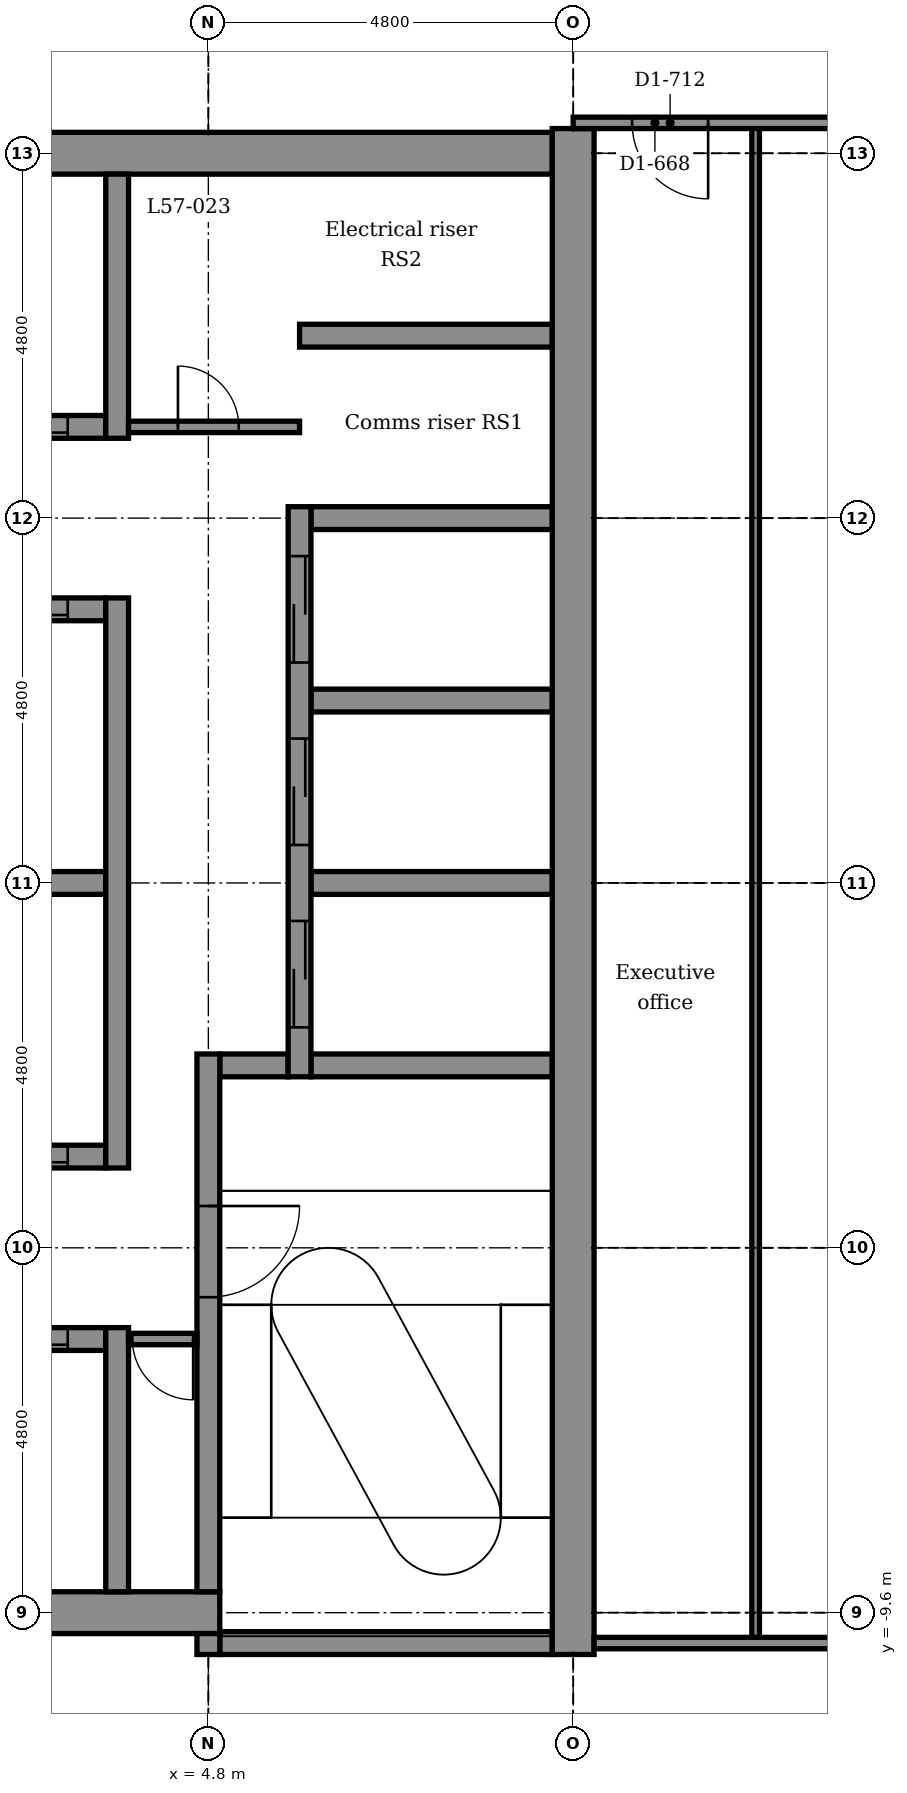
"""IFC4 building model, lengths in metres.
Left out: names, types, materials, properties, quantities, classifications, styles, units other than length and angle.
Written with IfcOpenShell. Run it as: python <this file> out.ifc"""

import sys

from ifc_helpers import new_model, si_unit, direction, frame, frame_2d, origin, place, context, subcontext, project, spatial, rectangle, extrude, element, fill, save


model = new_model("IFC4")
c1 = context("Model", 3, precision=1e-05, world=origin(), true_north=direction((0.0, 1.0)))
c2 = subcontext(c1, "Body", "Model", "MODEL_VIEW")
j1 = project(units=[si_unit("LENGTHUNIT", "METRE"), si_unit("PLANEANGLEUNIT", "RADIAN")], contexts=[c1])
p1 = place(None, origin())
s1 = spatial("IfcSite", under=j1, at=p1, CompositionType="ELEMENT")
p2 = place(p1, origin())
s2 = spatial("IfcBuilding", under=s1, at=p2, CompositionType="ELEMENT")
p3 = place(p2, frame((0.0, 0.0, 257.9)))
s3 = spatial("IfcBuildingStorey", under=s2, at=p3, CompositionType="ELEMENT", Elevation=257.9)
p4 = place(p3, frame((4.95, -10.0, -0.15), z_axis=(0.0, 0.0, 1.0), x_axis=(1.0, 0.0, 0.0)))
e1 = element("IfcWall", 1, at=p4, inside=s3, PredefinedType="STANDARD", context=c2, shape_type="SweptSolid", body=[
    extrude(rectangle(XDim=4.375, YDim=0.3, at=frame_2d((2.188, 0.0))), origin(), (0.0, 0.0, 1.0), 3.9),
])
p5 = place(p3, frame((-5.25, -9.6, -0.15), z_axis=(0.0, 0.0, 1.0), x_axis=(1.0, 0.0, 0.0)))
e2 = element("IfcWall", 2, at=p5, inside=s3, PredefinedType="SHEAR", context=c2, shape_type="SweptSolid", body=[
    extrude(rectangle(XDim=10.2, YDim=0.55, at=frame_2d((5.1, 0.0))), origin(), (0.0, 0.0, 1.0), 3.9),
])
p6 = place(p5, frame((0.6, 0.0, 0.15)))
e3 = element("IfcOpeningElement", 3, at=p6, cuts=e2, PredefinedType="OPENING", context=c2, shape_type="SweptSolid", body=[
    extrude(rectangle(XDim=0.9, YDim=2.1, at=frame_2d((0.45, 1.05))), frame((0.0, 0.285, 0.0), z_axis=(0.0, -1.0, 0.0), x_axis=(1.0, 0.0, 0.0)), (0.0, 0.0, 1.0), 0.57),
])
p7 = place(p3, frame((1.35, -6.0, -0.15), z_axis=(0.0, 0.0, 1.0), x_axis=(1.0, 0.0, 0.0)))
e4 = element("IfcWall", 4, at=p7, inside=s3, PredefinedType="STANDARD", context=c2, shape_type="SweptSolid", body=[
    extrude(rectangle(XDim=2.1, YDim=0.3, at=frame_2d((1.05, 0.0))), origin(), (0.0, 0.0, 1.0), 3.9),
])
p8 = place(p7, frame((0.5, 0.0, 0.15)))
e5 = element("IfcOpeningElement", 5, at=p8, cuts=e4, PredefinedType="OPENING", context=c2, shape_type="SweptSolid", body=[
    extrude(rectangle(XDim=1.1, YDim=2.1, at=frame_2d((0.55, 1.05))), frame((0.0, 0.16, 0.0), z_axis=(0.0, -1.0, 0.0), x_axis=(1.0, 0.0, 0.0)), (0.0, 0.0, 1.0), 0.32),
])
p9 = place(p3, frame((1.35, -3.6, -0.15), z_axis=(0.0, 0.0, 1.0), x_axis=(1.0, 0.0, 0.0)))
e6 = element("IfcWall", 6, at=p9, inside=s3, PredefinedType="STANDARD", context=c2, shape_type="SweptSolid", body=[
    extrude(rectangle(XDim=2.1, YDim=0.3, at=frame_2d((1.05, 0.0))), origin(), (0.0, 0.0, 1.0), 3.9),
])
p10 = place(p9, frame((0.5, 0.0, 0.15)))
e7 = element("IfcOpeningElement", 7, at=p10, cuts=e6, PredefinedType="OPENING", context=c2, shape_type="SweptSolid", body=[
    extrude(rectangle(XDim=1.1, YDim=2.1, at=frame_2d((0.55, 1.05))), frame((0.0, 0.16, 0.0), z_axis=(0.0, -1.0, 0.0), x_axis=(1.0, 0.0, 0.0)), (0.0, 0.0, 1.0), 0.32),
])
p11 = place(p3, frame((4.95, -2.4, -0.15), z_axis=(0.0, 0.0, 1.0), x_axis=(1.0, 0.0, 0.0)))
e8 = element("IfcWall", 8, at=p11, inside=s3, PredefinedType="STANDARD", context=c2, shape_type="SweptSolid", body=[
    extrude(rectangle(XDim=0.9, YDim=0.3, at=frame_2d((0.45, 0.0))), origin(), (0.0, 0.0, 1.0), 3.9),
])
p12 = place(p3, frame((6.15, -2.4, -0.15), z_axis=(0.0, 0.0, 1.0), x_axis=(1.0, 0.0, 0.0)))
e9 = element("IfcWall", 9, at=p12, inside=s3, PredefinedType="STANDARD", context=c2, shape_type="SweptSolid", body=[
    extrude(rectangle(XDim=3.175, YDim=0.3, at=frame_2d((1.587, 0.0))), origin(), (0.0, 0.0, 1.0), 3.9),
])
p13 = place(p3, frame((1.35, 0.0, -0.15), z_axis=(0.0, 0.0, 1.0), x_axis=(1.0, 0.0, 0.0)))
e10 = element("IfcWall", 10, at=p13, inside=s3, PredefinedType="STANDARD", context=c2, shape_type="SweptSolid", body=[
    extrude(rectangle(XDim=2.1, YDim=0.3, at=frame_2d((1.05, 0.0))), origin(), (0.0, 0.0, 1.0), 3.9),
])
for number, where, z_axis, x_axis in (
    (11, (6.15, 0.0, -0.15), (0.0, 0.0, 1.0), (1.0, 0.0, 0.0)),
    (12, (6.15, 2.4, -0.15), (0.0, 0.0, 1.0), (1.0, 0.0, 0.0)),
):
    element("IfcWall", number, at=place(p3, frame(where, z_axis=z_axis, x_axis=x_axis)), inside=s3, PredefinedType="STANDARD", context=c2, shape_type="SweptSolid", body=[
        extrude(rectangle(XDim=3.175, YDim=0.3, at=frame_2d((1.587, 0.0))), origin(), (0.0, 0.0, 1.0), 3.9),
    ])
p14 = place(p3, frame((1.35, 3.6, -0.15), z_axis=(0.0, 0.0, 1.0), x_axis=(1.0, 0.0, 0.0)))
e13 = element("IfcWall", 13, at=p14, inside=s3, PredefinedType="STANDARD", context=c2, shape_type="SweptSolid", body=[
    extrude(rectangle(XDim=2.1, YDim=0.3, at=frame_2d((1.05, 0.0))), origin(), (0.0, 0.0, 1.0), 3.9),
])
p15 = place(p14, frame((0.5, 0.0, 0.15)))
e14 = element("IfcOpeningElement", 14, at=p15, cuts=e13, PredefinedType="OPENING", context=c2, shape_type="SweptSolid", body=[
    extrude(rectangle(XDim=1.1, YDim=2.1, at=frame_2d((0.55, 1.05))), frame((0.0, 0.16, 0.0), z_axis=(0.0, -1.0, 0.0), x_axis=(1.0, 0.0, 0.0)), (0.0, 0.0, 1.0), 0.32),
])
p16 = place(p3, frame((6.15, 4.8, -0.15), z_axis=(0.0, 0.0, 1.0), x_axis=(1.0, 0.0, 0.0)))
e15 = element("IfcWall", 15, at=p16, inside=s3, PredefinedType="STANDARD", context=c2, shape_type="SweptSolid", body=[
    extrude(rectangle(XDim=3.175, YDim=0.3, at=frame_2d((1.587, 0.0))), origin(), (0.0, 0.0, 1.0), 3.9),
])
p17 = place(p3, frame((1.35, 6.0, -0.15), z_axis=(0.0, 0.0, 1.0), x_axis=(1.0, 0.0, 0.0)))
e16 = element("IfcWall", 16, at=p17, inside=s3, PredefinedType="STANDARD", context=c2, shape_type="SweptSolid", body=[
    extrude(rectangle(XDim=2.1, YDim=0.3, at=frame_2d((1.05, 0.0))), origin(), (0.0, 0.0, 1.0), 3.9),
])
p18 = place(p17, frame((0.5, 0.0, 0.15)))
e17 = element("IfcOpeningElement", 17, at=p18, cuts=e16, PredefinedType="OPENING", context=c2, shape_type="SweptSolid", body=[
    extrude(rectangle(XDim=1.1, YDim=2.1, at=frame_2d((0.55, 1.05))), frame((0.0, 0.16, 0.0), z_axis=(0.0, -1.0, 0.0), x_axis=(1.0, 0.0, 0.0)), (0.0, 0.0, 1.0), 0.32),
])
p19 = place(p3, frame((6.0, 7.2, -0.15), z_axis=(0.0, 0.0, 1.0), x_axis=(1.0, 0.0, 0.0)))
e18 = element("IfcWall", 18, at=p19, inside=s3, PredefinedType="STANDARD", context=c2, shape_type="SweptSolid", body=[
    extrude(rectangle(XDim=3.325, YDim=0.3, at=frame_2d((1.663, 0.0))), origin(), (0.0, 0.0, 1.0), 3.9),
])
p20 = place(p3, frame((-5.25, 9.6, -0.15), z_axis=(0.0, 0.0, 1.0), x_axis=(1.0, 0.0, 0.0)))
e19 = element("IfcWall", 19, at=p20, inside=s3, PredefinedType="SHEAR", context=c2, shape_type="SweptSolid", body=[
    extrude(rectangle(XDim=14.575, YDim=0.55, at=frame_2d((7.288, 0.0))), origin(), (0.0, 0.0, 1.0), 3.9),
])
p21 = place(p20, frame((0.6, 0.0, 0.15)))
e20 = element("IfcOpeningElement", 20, at=p21, cuts=e19, PredefinedType="OPENING", context=c2, shape_type="SweptSolid", body=[
    extrude(rectangle(XDim=0.9, YDim=2.1, at=frame_2d((0.45, 1.05))), frame((0.0, 0.285, 0.0), z_axis=(0.0, -1.0, 0.0), x_axis=(1.0, 0.0, 0.0)), (0.0, 0.0, 1.0), 0.57),
])
p22 = place(p3, frame((3.6, -9.325, -0.15), z_axis=(0.0, 0.0, 1.0), x_axis=(0.0, 1.0, 0.0)))
e21 = element("IfcWall", 21, at=p22, inside=s3, PredefinedType="STANDARD", context=c2, shape_type="SweptSolid", body=[
    extrude(rectangle(XDim=3.475, YDim=0.3, at=frame_2d((1.737, 0.0))), origin(), (0.0, 0.0, 1.0), 3.9),
])
p23 = place(p3, frame((3.6, -3.75, -0.15), z_axis=(0.0, 0.0, 1.0), x_axis=(0.0, 1.0, 0.0)))
e22 = element("IfcWall", 22, at=p23, inside=s3, PredefinedType="STANDARD", context=c2, shape_type="SweptSolid", body=[
    extrude(rectangle(XDim=7.5, YDim=0.3, at=frame_2d((3.75, 0.0))), origin(), (0.0, 0.0, 1.0), 3.9),
])
p24 = place(p3, frame((3.6, 5.85, -0.15), z_axis=(0.0, 0.0, 1.0), x_axis=(0.0, 1.0, 0.0)))
e23 = element("IfcWall", 23, at=p24, inside=s3, PredefinedType="STANDARD", context=c2, shape_type="SweptSolid", body=[
    extrude(rectangle(XDim=3.475, YDim=0.3, at=frame_2d((1.737, 0.0))), origin(), (0.0, 0.0, 1.0), 3.9),
])
p25 = place(p3, frame((4.8, -10.15, -0.15), z_axis=(0.0, 0.0, 1.0), x_axis=(0.0, 1.0, 0.0)))
e24 = element("IfcWall", 24, at=p25, inside=s3, PredefinedType="STANDARD", context=c2, shape_type="SweptSolid", body=[
    extrude(rectangle(XDim=0.275, YDim=0.3, at=frame_2d((0.137, 0.0))), origin(), (0.0, 0.0, 1.0), 3.9),
])
p26 = place(p3, frame((4.8, -9.325, -0.15), z_axis=(0.0, 0.0, 1.0), x_axis=(0.0, 1.0, 0.0)))
e25 = element("IfcWall", 25, at=p26, inside=s3, PredefinedType="STANDARD", context=c2, shape_type="SweptSolid", body=[
    extrude(rectangle(XDim=7.075, YDim=0.3, at=frame_2d((3.538, 0.0))), origin(), (0.0, 0.0, 1.0), 3.9),
])
p27 = place(p26, frame((3.875, 0.0, 0.15)))
e26 = element("IfcOpeningElement", 26, at=p27, cuts=e25, PredefinedType="OPENING", context=c2, shape_type="SweptSolid", body=[
    extrude(rectangle(XDim=1.2, YDim=2.1, at=frame_2d((0.6, 1.05))), frame((0.0, 0.16, 0.0), z_axis=(0.0, -1.0, 0.0), x_axis=(1.0, 0.0, 0.0)), (0.0, 0.0, 1.0), 0.32),
])
p28 = place(p3, frame((6.0, -2.55, -0.15), z_axis=(0.0, 0.0, 1.0), x_axis=(0.0, 1.0, 0.0)))
e27 = element("IfcWall", 27, at=p28, inside=s3, PredefinedType="STANDARD", context=c2, shape_type="SweptSolid", body=[
    extrude(rectangle(XDim=7.5, YDim=0.3, at=frame_2d((3.75, 0.0))), origin(), (0.0, 0.0, 1.0), 3.9),
])
p29 = place(p28, frame((0.65, 0.0, 0.15)))
e28 = element("IfcOpeningElement", 28, at=p29, cuts=e27, PredefinedType="OPENING", context=c2, shape_type="SweptSolid", body=[
    extrude(rectangle(XDim=1.4, YDim=2.1, at=frame_2d((0.7, 1.05))), frame((0.0, 0.16, 0.0), z_axis=(0.0, -1.0, 0.0), x_axis=(1.0, 0.0, 0.0)), (0.0, 0.0, 1.0), 0.32),
])
p30 = place(p28, frame((3.05, 0.0, 0.15)))
e29 = element("IfcOpeningElement", 29, at=p30, cuts=e27, PredefinedType="OPENING", context=c2, shape_type="SweptSolid", body=[
    extrude(rectangle(XDim=1.4, YDim=2.1, at=frame_2d((0.7, 1.05))), frame((0.0, 0.16, 0.0), z_axis=(0.0, -1.0, 0.0), x_axis=(1.0, 0.0, 0.0)), (0.0, 0.0, 1.0), 0.32),
])
p31 = place(p28, frame((5.45, 0.0, 0.15)))
e30 = element("IfcOpeningElement", 30, at=p31, cuts=e27, PredefinedType="OPENING", context=c2, shape_type="SweptSolid", body=[
    extrude(rectangle(XDim=1.4, YDim=2.1, at=frame_2d((0.7, 1.05))), frame((0.0, 0.16, 0.0), z_axis=(0.0, -1.0, 0.0), x_axis=(1.0, 0.0, 0.0)), (0.0, 0.0, 1.0), 0.32),
])
p32 = place(p3, frame((9.6, -10.15, -0.15), z_axis=(0.0, 0.0, 1.0), x_axis=(0.0, 1.0, 0.0)))
e31 = element("IfcWall", 31, at=p32, inside=s3, PredefinedType="SHEAR", context=c2, shape_type="SweptSolid", body=[
    extrude(rectangle(XDim=20.075, YDim=0.55, at=frame_2d((10.038, 0.0))), origin(), (0.0, 0.0, 1.0), 3.9),
])
p33 = place(p3, frame((12.0, -10.0, 0.0), z_axis=(0.0, 0.0, 1.0), x_axis=(0.0, 1.0, 0.0)))
e32 = element("IfcWall", 32, at=p33, inside=s3, PredefinedType="PARTITIONING", context=c2, shape_type="SweptSolid", body=[
    extrude(rectangle(XDim=20.0, YDim=0.1, at=frame_2d((10.0, 0.0))), origin(), (0.0, 0.0, 1.0), 3.75),
])
p34 = place(p3, frame((9.875, -10.0, 0.0), z_axis=(0.0, 0.0, 1.0), x_axis=(1.0, 0.0, 0.0)))
e33 = element("IfcWall", 33, at=p34, inside=s3, PredefinedType="PARTITIONING", context=c2, shape_type="SweptSolid", body=[
    extrude(rectangle(XDim=4.68, YDim=0.15, at=frame_2d((2.34, 0.0))), origin(), (0.0, 0.0, 1.0), 3.75),
])
p35 = place(p3, frame((3.75, -6.0, 0.0), z_axis=(0.0, 0.0, 1.0), x_axis=(1.0, 0.0, 0.0)))
e34 = element("IfcWall", 34, at=p35, inside=s3, PredefinedType="PARTITIONING", context=c2, shape_type="SweptSolid", body=[
    extrude(rectangle(XDim=0.9, YDim=0.15, at=frame_2d((0.45, 0.0))), origin(), (0.0, 0.0, 1.0), 3.75),
])
p36 = place(p35, frame((0.05, 0.0, 0.0)))
e35 = element("IfcOpeningElement", 35, at=p36, cuts=e34, PredefinedType="OPENING", context=c2, shape_type="SweptSolid", body=[
    extrude(rectangle(XDim=0.8, YDim=2.1, at=frame_2d((0.4, 1.05))), frame((0.0, 0.085, 0.0), z_axis=(0.0, -1.0, 0.0), x_axis=(1.0, 0.0, 0.0)), (0.0, 0.0, 1.0), 0.17),
])
p37 = place(p3, frame((3.75, 6.0, 0.0), z_axis=(0.0, 0.0, 1.0), x_axis=(1.0, 0.0, 0.0)))
e36 = element("IfcWall", 36, at=p37, inside=s3, PredefinedType="PARTITIONING", context=c2, shape_type="SweptSolid", body=[
    extrude(rectangle(XDim=2.25, YDim=0.15, at=frame_2d((1.125, 0.0))), origin(), (0.0, 0.0, 1.0), 3.75),
])
p38 = place(p37, frame((0.65, 0.0, 0.0)))
e37 = element("IfcOpeningElement", 37, at=p38, cuts=e36, PredefinedType="OPENING", context=c2, shape_type="SweptSolid", body=[
    extrude(rectangle(XDim=0.8, YDim=2.1, at=frame_2d((0.4, 1.05))), frame((0.0, 0.085, 0.0), z_axis=(0.0, -1.0, 0.0), x_axis=(1.0, 0.0, 0.0)), (0.0, 0.0, 1.0), 0.17),
])
p39 = place(p3, frame((9.6, 10.0, 0.0), z_axis=(0.0, 0.0, 1.0), x_axis=(1.0, 0.0, 0.0)))
e38 = element("IfcWall", 38, at=p39, inside=s3, PredefinedType="PARTITIONING", context=c2, shape_type="SweptSolid", body=[
    extrude(rectangle(XDim=4.955, YDim=0.15, at=frame_2d((2.477, 0.0))), origin(), (0.0, 0.0, 1.0), 3.75),
])
p40 = place(p39, frame((0.775, 0.0, 0.0)))
e39 = element("IfcOpeningElement", 39, at=p40, cuts=e38, PredefinedType="OPENING", context=c2, shape_type="SweptSolid", body=[
    extrude(rectangle(XDim=1.0, YDim=2.1, at=frame_2d((0.5, 1.05))), frame((0.0, 0.085, 0.0), z_axis=(0.0, -1.0, 0.0), x_axis=(1.0, 0.0, 0.0)), (0.0, 0.0, 1.0), 0.17),
])
p41 = place(p38, origin())
e40 = element("IfcDoor", 40, at=p41, inside=s3, OperationType="SINGLE_SWING_LEFT", PredefinedType="DOOR", context=c2, shape_type="SweptSolid", body=[
    extrude(rectangle(XDim=0.8, YDim=2.1, at=frame_2d((0.4, 1.05))), frame((0.0, 0.025, 0.0), z_axis=(0.0, -1.0, 0.0), x_axis=(1.0, 0.0, 0.0)), (0.0, 0.0, 1.0), 0.05),
])
fill(e37, e40)
p42 = place(p36, frame((0.8, 0.0, 0.0), z_axis=(0.0, 0.0, 1.0), x_axis=(-1.0, 0.0, 0.0)))
e41 = element("IfcDoor", 41, at=p42, inside=s3, OperationType="SINGLE_SWING_RIGHT", PredefinedType="DOOR", context=c2, shape_type="SweptSolid", body=[
    extrude(rectangle(XDim=0.8, YDim=2.1, at=frame_2d((0.4, 1.05))), frame((0.0, 0.025, 0.0), z_axis=(0.0, -1.0, 0.0), x_axis=(1.0, 0.0, 0.0)), (0.0, 0.0, 1.0), 0.05),
])
fill(e35, e41)
p43 = place(p40, frame((1.0, 0.0, 0.0), z_axis=(0.0, 0.0, 1.0), x_axis=(-1.0, 0.0, 0.0)))
e42 = element("IfcDoor", 42, at=p43, inside=s3, OperationType="SINGLE_SWING_RIGHT", PredefinedType="DOOR", context=c2, shape_type="SweptSolid", body=[
    extrude(rectangle(XDim=1.0, YDim=2.1, at=frame_2d((0.5, 1.05))), frame((0.0, 0.025, 0.0), z_axis=(0.0, -1.0, 0.0), x_axis=(1.0, 0.0, 0.0)), (0.0, 0.0, 1.0), 0.05),
])
fill(e39, e42)
p44 = place(p29, origin())
e43 = element("IfcDoor", 43, at=p44, inside=s3, OperationType="DOUBLE_DOOR_SLIDING", PredefinedType="DOOR", context=c2, shape_type="SweptSolid", body=[
    extrude(rectangle(XDim=1.4, YDim=2.1, at=frame_2d((0.7, 1.05))), frame((0.0, 0.025, 0.0), z_axis=(0.0, -1.0, 0.0), x_axis=(1.0, 0.0, 0.0)), (0.0, 0.0, 1.0), 0.05),
])
fill(e28, e43)
p45 = place(p30, origin())
e44 = element("IfcDoor", 44, at=p45, inside=s3, OperationType="DOUBLE_DOOR_SLIDING", PredefinedType="DOOR", context=c2, shape_type="SweptSolid", body=[
    extrude(rectangle(XDim=1.4, YDim=2.1, at=frame_2d((0.7, 1.05))), frame((0.0, 0.025, 0.0), z_axis=(0.0, -1.0, 0.0), x_axis=(1.0, 0.0, 0.0)), (0.0, 0.0, 1.0), 0.05),
])
fill(e29, e44)
p46 = place(p31, origin())
e45 = element("IfcDoor", 45, at=p46, inside=s3, OperationType="DOUBLE_DOOR_SLIDING", PredefinedType="DOOR", context=c2, shape_type="SweptSolid", body=[
    extrude(rectangle(XDim=1.4, YDim=2.1, at=frame_2d((0.7, 1.05))), frame((0.0, 0.025, 0.0), z_axis=(0.0, -1.0, 0.0), x_axis=(1.0, 0.0, 0.0)), (0.0, 0.0, 1.0), 0.05),
])
fill(e30, e45)
p47 = place(p18, origin())
e46 = element("IfcDoor", 46, at=p47, inside=s3, OperationType="DOUBLE_DOOR_SLIDING", PredefinedType="DOOR", context=c2, shape_type="SweptSolid", body=[
    extrude(rectangle(XDim=1.1, YDim=2.1, at=frame_2d((0.55, 1.05))), frame((0.0, 0.025, 0.0), z_axis=(0.0, -1.0, 0.0), x_axis=(1.0, 0.0, 0.0)), (0.0, 0.0, 1.0), 0.05),
])
fill(e17, e46)
p48 = place(p15, origin())
e47 = element("IfcDoor", 47, at=p48, inside=s3, OperationType="DOUBLE_DOOR_SLIDING", PredefinedType="DOOR", context=c2, shape_type="SweptSolid", body=[
    extrude(rectangle(XDim=1.1, YDim=2.1, at=frame_2d((0.55, 1.05))), frame((0.0, 0.025, 0.0), z_axis=(0.0, -1.0, 0.0), x_axis=(1.0, 0.0, 0.0)), (0.0, 0.0, 1.0), 0.05),
])
fill(e14, e47)
p49 = place(p10, origin())
e48 = element("IfcDoor", 48, at=p49, inside=s3, OperationType="DOUBLE_DOOR_SLIDING", PredefinedType="DOOR", context=c2, shape_type="SweptSolid", body=[
    extrude(rectangle(XDim=1.1, YDim=2.1, at=frame_2d((0.55, 1.05))), frame((0.0, 0.025, 0.0), z_axis=(0.0, -1.0, 0.0), x_axis=(1.0, 0.0, 0.0)), (0.0, 0.0, 1.0), 0.05),
])
fill(e7, e48)
p50 = place(p8, origin())
e49 = element("IfcDoor", 49, at=p50, inside=s3, OperationType="DOUBLE_DOOR_SLIDING", PredefinedType="DOOR", context=c2, shape_type="SweptSolid", body=[
    extrude(rectangle(XDim=1.1, YDim=2.1, at=frame_2d((0.55, 1.05))), frame((0.0, 0.025, 0.0), z_axis=(0.0, -1.0, 0.0), x_axis=(1.0, 0.0, 0.0)), (0.0, 0.0, 1.0), 0.05),
])
fill(e5, e49)
p51 = place(p27, frame((1.2, 0.0, 0.0), z_axis=(0.0, 0.0, 1.0), x_axis=(-1.0, 0.0, 0.0)))
e50 = element("IfcDoor", 50, at=p51, inside=s3, OperationType="SINGLE_SWING_RIGHT", PredefinedType="DOOR", context=c2, shape_type="SweptSolid", body=[
    extrude(rectangle(XDim=1.2, YDim=2.1, at=frame_2d((0.6, 1.05))), frame((0.0, 0.025, 0.0), z_axis=(0.0, -1.0, 0.0), x_axis=(1.0, 0.0, 0.0)), (0.0, 0.0, 1.0), 0.05),
])
fill(e26, e50)
save(model, sys.argv[1])
